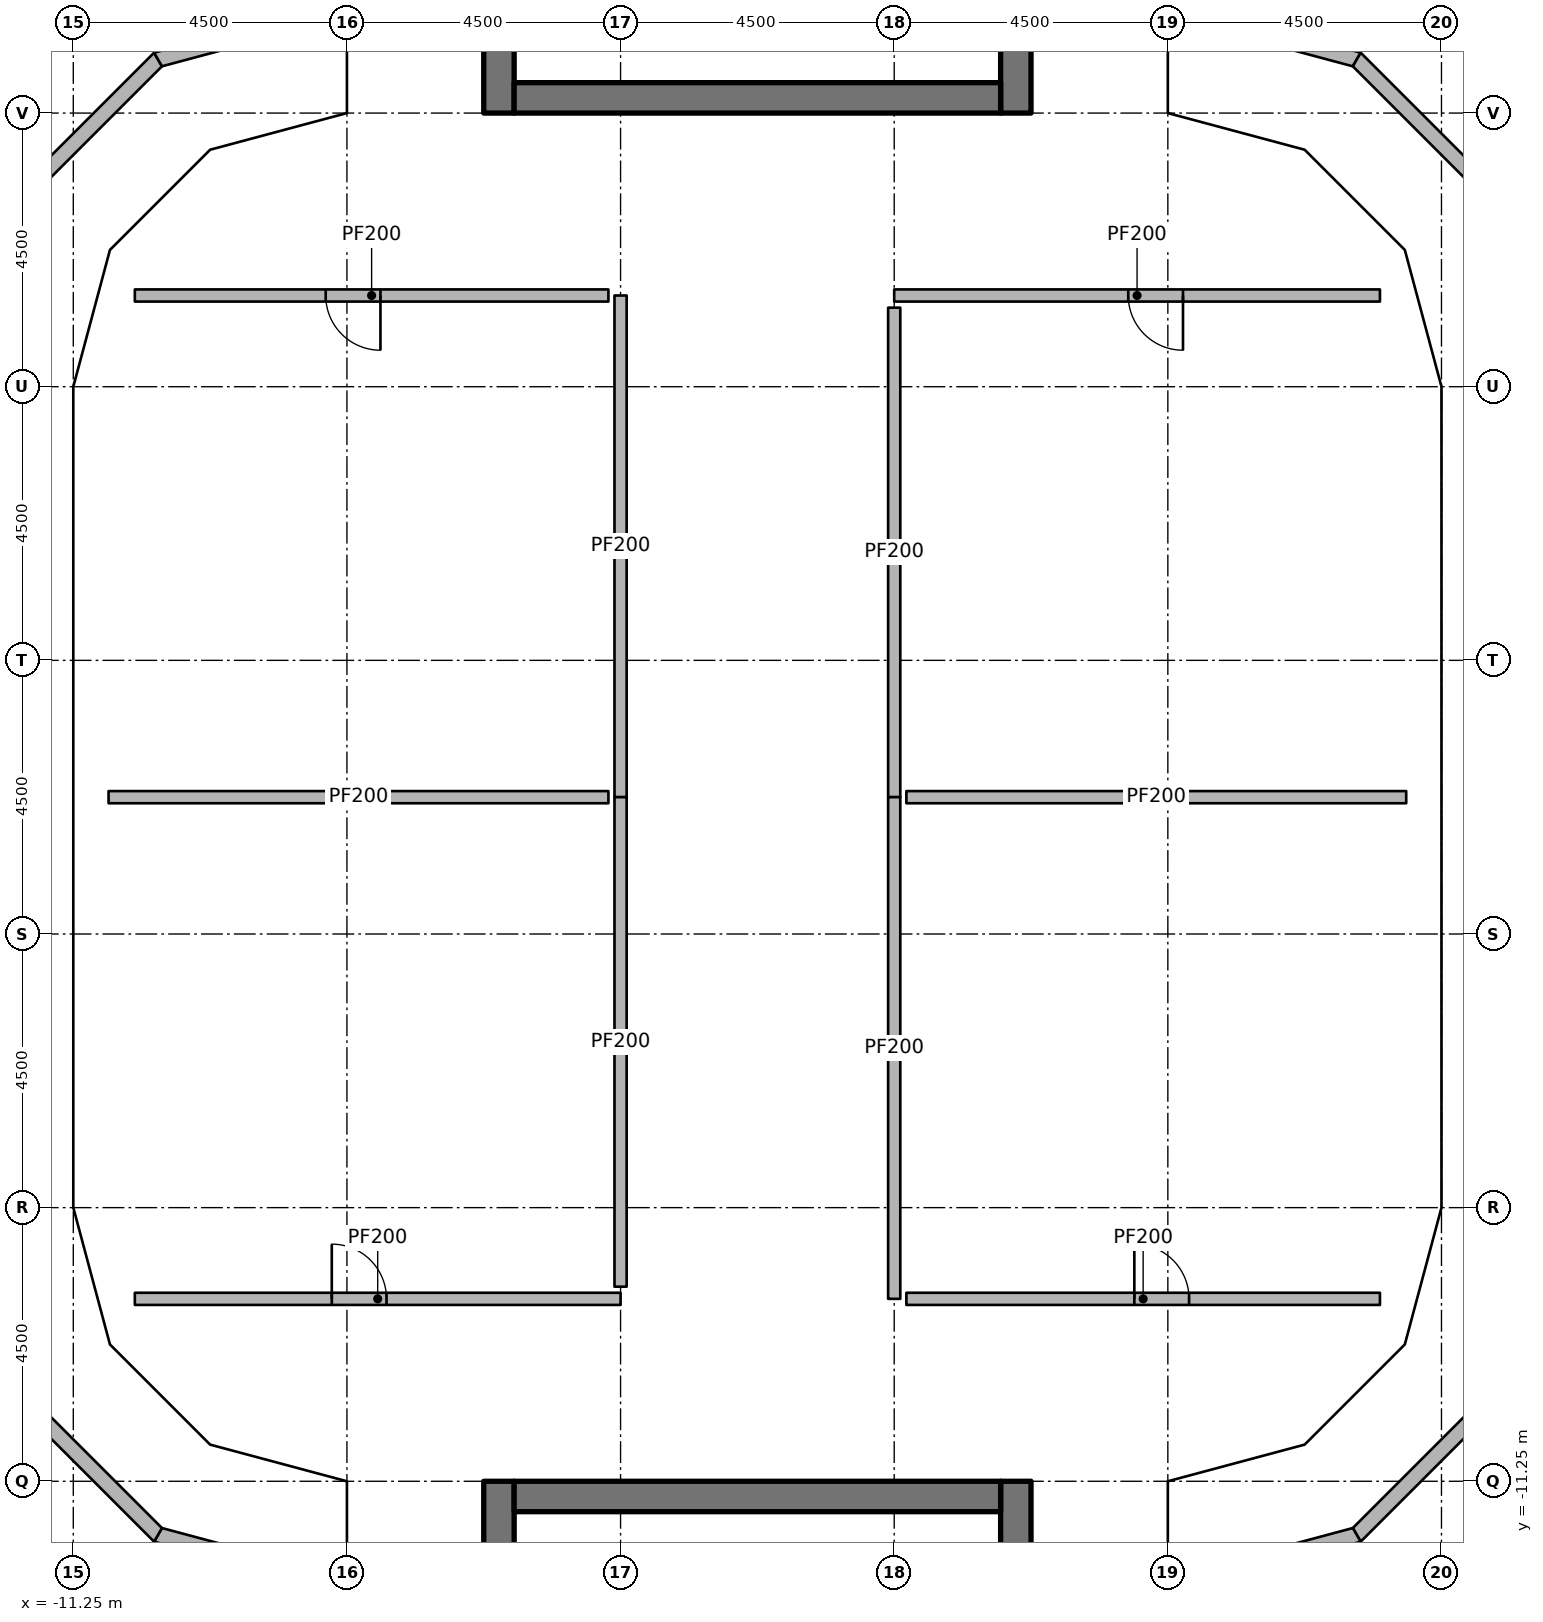
"""IFC4 building model, lengths in metres.
Left out: names, types, materials, properties, quantities, classifications, styles, units other than length and angle.
Written with IfcOpenShell. Run it as: python <this file> out.ifc"""

import sys

from ifc_helpers import new_model, si_unit, direction, frame, frame_2d, origin, origin_2d, place, context, subcontext, project, spatial, polyline, rectangle, outline, extrude, element, fill, save


model = new_model("IFC4")
c1 = context("Model", 3, precision=1e-05, world=origin(), true_north=direction((0.0, 1.0)))
c2 = subcontext(c1, "Body", "Model", "MODEL_VIEW")
j1 = project(units=[si_unit("LENGTHUNIT", "METRE"), si_unit("PLANEANGLEUNIT", "RADIAN")], contexts=[c1])
p1 = place(None, origin())
s1 = spatial("IfcSite", under=j1, at=p1, CompositionType="ELEMENT")
p2 = place(p1, origin())
s2 = spatial("IfcBuilding", under=s1, at=p2, CompositionType="ELEMENT")
p3 = place(p2, frame((0.0, 0.0, 302.4)))
s3 = spatial("IfcBuildingStorey", under=s2, at=p3, CompositionType="ELEMENT", Elevation=302.4)
for number, where, z_axis, x_axis in (
    (1, (-10.75, -6.25, 0.0), (0.0, 0.0, 1.0), (1.0, 0.0, 0.0)),
    (2, (-10.75, 6.25, 0.0), (0.0, 0.0, 1.0), (1.0, 0.0, 0.0)),
    (3, (-6.25, -10.75, 0.0), (0.0, 0.0, 1.0), (1.0, 0.0, 0.0)),
    (4, (-6.25, -6.25, 0.0), (0.0, 0.0, 1.0), (1.0, 0.0, 0.0)),
    (5, (-6.25, 6.25, 0.0), (0.0, 0.0, 1.0), (1.0, 0.0, 0.0)),
    (6, (-6.25, 10.75, 0.0), (0.0, 0.0, 1.0), (1.0, 0.0, 0.0)),
    (7, (6.25, -10.75, 0.0), (0.0, 0.0, 1.0), (1.0, 0.0, 0.0)),
    (8, (6.25, -6.25, 0.0), (0.0, 0.0, 1.0), (1.0, 0.0, 0.0)),
    (9, (6.25, 6.25, 0.0), (0.0, 0.0, 1.0), (1.0, 0.0, 0.0)),
    (10, (6.25, 10.75, 0.0), (0.0, 0.0, 1.0), (1.0, 0.0, 0.0)),
    (11, (10.75, -6.25, 0.0), (0.0, 0.0, 1.0), (1.0, 0.0, 0.0)),
    (12, (10.75, 6.25, 0.0), (0.0, 0.0, 1.0), (1.0, 0.0, 0.0)),
):
    element("IfcColumn", number, at=place(p3, frame(where, z_axis=z_axis, x_axis=x_axis)), inside=s3, PredefinedType="COLUMN", context=c2, shape_type="SweptSolid", body=[
        extrude(rectangle(XDim=0.6, YDim=0.6, at=origin_2d()), origin(), (0.0, 0.0, 1.0), 3.45),
    ])
p4 = place(p3, frame((-4.25, 11.25, 0.0), z_axis=(0.0, 0.0, 1.0), x_axis=(0.0, 1.0, 0.0)))
e13 = element("IfcWall", 13, at=p4, inside=s3, PredefinedType="SHEAR", context=c2, shape_type="SweptSolid", body=[
    extrude(rectangle(XDim=15.0, YDim=0.5, at=frame_2d((7.5, 0.0))), origin(), (0.0, 0.0, 1.0), 3.6),
])
p5 = place(p4, frame((7.15, 0.0, 0.0)))
e14 = element("IfcOpeningElement", 14, at=p5, cuts=e13, PredefinedType="OPENING", context=c2, shape_type="SweptSolid", body=[
    extrude(rectangle(XDim=1.5, YDim=2.3, at=frame_2d((0.75, 1.15))), frame((0.0, 0.26, 0.0), z_axis=(0.0, -1.0, 0.0), x_axis=(1.0, 0.0, 0.0)), (0.0, 0.0, 1.0), 0.52),
])
p6 = place(p4, frame((13.9, 0.0, 0.0)))
e15 = element("IfcOpeningElement", 15, at=p6, cuts=e13, PredefinedType="OPENING", context=c2, shape_type="SweptSolid", body=[
    extrude(rectangle(XDim=0.9, YDim=2.1, at=frame_2d((0.45, 1.05))), frame((0.0, 0.26, 0.0), z_axis=(0.0, -1.0, 0.0), x_axis=(1.0, 0.0, 0.0)), (0.0, 0.0, 1.0), 0.52),
])
p7 = place(p4, frame((1.15, 0.0, 0.0)))
e16 = element("IfcOpeningElement", 16, at=p7, cuts=e13, PredefinedType="OPENING", context=c2, shape_type="SweptSolid", body=[
    extrude(rectangle(XDim=1.2, YDim=2.1, at=frame_2d((0.6, 1.05))), frame((0.0, 0.26, 0.0), z_axis=(0.0, -1.0, 0.0), x_axis=(1.0, 0.0, 0.0)), (0.0, 0.0, 1.0), 0.52),
])
p8 = place(p3, frame((4.25, 11.25, 0.0), z_axis=(0.0, 0.0, 1.0), x_axis=(0.0, 1.0, 0.0)))
e17 = element("IfcWall", 17, at=p8, inside=s3, PredefinedType="SHEAR", context=c2, shape_type="SweptSolid", body=[
    extrude(rectangle(XDim=15.0, YDim=0.5, at=frame_2d((7.5, 0.0))), origin(), (0.0, 0.0, 1.0), 3.6),
])
p9 = place(p8, frame((7.15, 0.0, 0.0)))
e18 = element("IfcOpeningElement", 18, at=p9, cuts=e17, PredefinedType="OPENING", context=c2, shape_type="SweptSolid", body=[
    extrude(rectangle(XDim=1.5, YDim=2.3, at=frame_2d((0.75, 1.15))), frame((0.0, 0.26, 0.0), z_axis=(0.0, -1.0, 0.0), x_axis=(1.0, 0.0, 0.0)), (0.0, 0.0, 1.0), 0.52),
])
p10 = place(p8, frame((5.55, 0.0, 0.0)))
e19 = element("IfcOpeningElement", 19, at=p10, cuts=e17, PredefinedType="OPENING", context=c2, shape_type="SweptSolid", body=[
    extrude(rectangle(XDim=1.2, YDim=2.1, at=frame_2d((0.6, 1.05))), frame((0.0, 0.26, 0.0), z_axis=(0.0, -1.0, 0.0), x_axis=(1.0, 0.0, 0.0)), (0.0, 0.0, 1.0), 0.52),
])
p11 = place(p3, frame((-4.0, 11.5, 0.0), z_axis=(0.0, 0.0, 1.0), x_axis=(1.0, 0.0, 0.0)))
e20 = element("IfcWall", 20, at=p11, inside=s3, PredefinedType="SHEAR", context=c2, shape_type="SweptSolid", body=[
    extrude(rectangle(XDim=8.0, YDim=0.5, at=frame_2d((4.0, 0.0))), origin(), (0.0, 0.0, 1.0), 3.6),
])
p12 = place(p3, frame((-4.25, -11.25, 0.0), z_axis=(0.0, 0.0, 1.0), x_axis=(0.0, -1.0, 0.0)))
e21 = element("IfcWall", 21, at=p12, inside=s3, PredefinedType="SHEAR", context=c2, shape_type="SweptSolid", body=[
    extrude(rectangle(XDim=15.0, YDim=0.5, at=frame_2d((7.5, 0.0))), origin(), (0.0, 0.0, 1.0), 3.6),
])
p13 = place(p12, frame((7.15, 0.0, 0.0)))
e22 = element("IfcOpeningElement", 22, at=p13, cuts=e21, PredefinedType="OPENING", context=c2, shape_type="SweptSolid", body=[
    extrude(rectangle(XDim=1.5, YDim=2.3, at=frame_2d((0.75, 1.15))), frame((0.0, 0.26, 0.0), z_axis=(0.0, -1.0, 0.0), x_axis=(1.0, 0.0, 0.0)), (0.0, 0.0, 1.0), 0.52),
])
p14 = place(p12, frame((5.55, 0.0, 0.0)))
e23 = element("IfcOpeningElement", 23, at=p14, cuts=e21, PredefinedType="OPENING", context=c2, shape_type="SweptSolid", body=[
    extrude(rectangle(XDim=1.2, YDim=2.1, at=frame_2d((0.6, 1.05))), frame((0.0, 0.26, 0.0), z_axis=(0.0, -1.0, 0.0), x_axis=(1.0, 0.0, 0.0)), (0.0, 0.0, 1.0), 0.52),
])
p15 = place(p3, frame((4.25, -11.25, 0.0), z_axis=(0.0, 0.0, 1.0), x_axis=(0.0, -1.0, 0.0)))
e24 = element("IfcWall", 24, at=p15, inside=s3, PredefinedType="SHEAR", context=c2, shape_type="SweptSolid", body=[
    extrude(rectangle(XDim=15.0, YDim=0.5, at=frame_2d((7.5, 0.0))), origin(), (0.0, 0.0, 1.0), 3.6),
])
p16 = place(p15, frame((7.15, 0.0, 0.0)))
e25 = element("IfcOpeningElement", 25, at=p16, cuts=e24, PredefinedType="OPENING", context=c2, shape_type="SweptSolid", body=[
    extrude(rectangle(XDim=1.5, YDim=2.3, at=frame_2d((0.75, 1.15))), frame((0.0, 0.26, 0.0), z_axis=(0.0, -1.0, 0.0), x_axis=(1.0, 0.0, 0.0)), (0.0, 0.0, 1.0), 0.52),
])
p17 = place(p15, frame((13.9, 0.0, 0.0)))
e26 = element("IfcOpeningElement", 26, at=p17, cuts=e24, PredefinedType="OPENING", context=c2, shape_type="SweptSolid", body=[
    extrude(rectangle(XDim=0.9, YDim=2.1, at=frame_2d((0.45, 1.05))), frame((0.0, 0.26, 0.0), z_axis=(0.0, -1.0, 0.0), x_axis=(1.0, 0.0, 0.0)), (0.0, 0.0, 1.0), 0.52),
])
p18 = place(p15, frame((1.15, 0.0, 0.0)))
e27 = element("IfcOpeningElement", 27, at=p18, cuts=e24, PredefinedType="OPENING", context=c2, shape_type="SweptSolid", body=[
    extrude(rectangle(XDim=1.2, YDim=2.1, at=frame_2d((0.6, 1.05))), frame((0.0, 0.26, 0.0), z_axis=(0.0, -1.0, 0.0), x_axis=(1.0, 0.0, 0.0)), (0.0, 0.0, 1.0), 0.52),
])
p19 = place(p3, frame((-4.0, -11.5, 0.0), z_axis=(0.0, 0.0, 1.0), x_axis=(1.0, 0.0, 0.0)))
e28 = element("IfcWall", 28, at=p19, inside=s3, PredefinedType="SHEAR", context=c2, shape_type="SweptSolid", body=[
    extrude(rectangle(XDim=8.0, YDim=0.5, at=frame_2d((4.0, 0.0))), origin(), (0.0, 0.0, 1.0), 3.6),
])
p20 = place(p3, origin())
e29 = element("IfcWall", 29, at=p20, inside=s3, PredefinedType="PARAPET", context=c2, shape_type="SweptSolid", body=[
    extrude(outline(polyline([(-8.53, -12.616), (-9.921, -12.243), (-9.792, -12.019), (-8.28, -12.424), (-8.53, -12.616)])), origin(), (0.0, 0.0, 1.0), 1.22),
])
p21 = place(p3, origin())
e30 = element("IfcWall", 30, at=p21, inside=s3, PredefinedType="PARAPET", context=c2, shape_type="SweptSolid", body=[
    extrude(outline(polyline([(-9.921, -12.243), (-12.243, -9.921), (-12.019, -9.792), (-9.792, -12.019), (-9.921, -12.243)])), origin(), (0.0, 0.0, 1.0), 1.22),
])
p22 = place(p3, origin())
e31 = element("IfcWall", 31, at=p22, inside=s3, PredefinedType="PARAPET", context=c2, shape_type="SweptSolid", body=[
    extrude(outline(polyline([(-12.243, 9.921), (-9.921, 12.243), (-9.792, 12.019), (-12.019, 9.792), (-12.243, 9.921)])), origin(), (0.0, 0.0, 1.0), 1.22),
])
p23 = place(p3, origin())
e32 = element("IfcWall", 32, at=p23, inside=s3, PredefinedType="PARAPET", context=c2, shape_type="SweptSolid", body=[
    extrude(outline(polyline([(-9.921, 12.243), (-8.53, 12.616), (-8.28, 12.424), (-9.792, 12.019), (-9.921, 12.243)])), origin(), (0.0, 0.0, 1.0), 1.22),
])
p24 = place(p3, origin())
e33 = element("IfcWall", 33, at=p24, inside=s3, PredefinedType="PARAPET", context=c2, shape_type="SweptSolid", body=[
    extrude(outline(polyline([(8.53, 12.616), (9.921, 12.243), (9.792, 12.019), (8.28, 12.424), (8.53, 12.616)])), origin(), (0.0, 0.0, 1.0), 1.22),
])
p25 = place(p3, origin())
e34 = element("IfcWall", 34, at=p25, inside=s3, PredefinedType="PARAPET", context=c2, shape_type="SweptSolid", body=[
    extrude(outline(polyline([(9.921, 12.243), (12.243, 9.921), (12.019, 9.792), (9.792, 12.019), (9.921, 12.243)])), origin(), (0.0, 0.0, 1.0), 1.22),
])
p26 = place(p3, origin())
e35 = element("IfcWall", 35, at=p26, inside=s3, PredefinedType="PARAPET", context=c2, shape_type="SweptSolid", body=[
    extrude(outline(polyline([(12.243, -9.921), (9.921, -12.243), (9.792, -12.019), (12.019, -9.792), (12.243, -9.921)])), origin(), (0.0, 0.0, 1.0), 1.22),
])
p27 = place(p3, origin())
e36 = element("IfcWall", 36, at=p27, inside=s3, PredefinedType="PARAPET", context=c2, shape_type="SweptSolid", body=[
    extrude(outline(polyline([(9.921, -12.243), (8.53, -12.616), (8.28, -12.424), (9.792, -12.019), (9.921, -12.243)])), origin(), (0.0, 0.0, 1.0), 1.22),
])
p28 = place(p3, frame((10.238, 8.25, 0.0), z_axis=(0.0, 0.0, 1.0), x_axis=(-1.0, 0.0, 0.0)))
e37 = element("IfcWall", 37, at=p28, inside=s3, PredefinedType="PARTITIONING", context=c2, shape_type="SweptSolid", body=[
    extrude(rectangle(XDim=7.988, YDim=0.2, at=frame_2d((3.994, 0.0))), origin(), (0.0, 0.0, 1.0), 2.53),
])
p29 = place(p28, frame((3.239, 0.0, 0.0)))
e38 = element("IfcOpeningElement", 38, at=p29, cuts=e37, PredefinedType="OPENING", context=c2, shape_type="SweptSolid", body=[
    extrude(rectangle(XDim=0.9, YDim=2.1, at=frame_2d((0.45, 1.05))), frame((0.0, 0.11, 0.0), z_axis=(0.0, -1.0, 0.0), x_axis=(1.0, 0.0, 0.0)), (0.0, 0.0, 1.0), 0.22),
])
p30 = place(p3, frame((2.25, 8.05, 0.0), z_axis=(0.0, 0.0, 1.0), x_axis=(0.0, -1.0, 0.0)))
e39 = element("IfcWall", 39, at=p30, inside=s3, PredefinedType="PARTITIONING", context=c2, shape_type="SweptSolid", body=[
    extrude(rectangle(XDim=8.05, YDim=0.2, at=frame_2d((4.025, 0.0))), origin(), (0.0, 0.0, 1.0), 2.828),
])
p31 = place(p3, frame((2.25, 0.0, 0.0), z_axis=(0.0, 0.0, 1.0), x_axis=(0.0, -1.0, 0.0)))
e40 = element("IfcWall", 40, at=p31, inside=s3, PredefinedType="PARTITIONING", context=c2, shape_type="SweptSolid", body=[
    extrude(rectangle(XDim=8.25, YDim=0.2, at=frame_2d((4.125, 0.0))), origin(), (0.0, 0.0, 1.0), 2.828),
])
p32 = place(p3, frame((2.45, -8.25, 0.0), z_axis=(0.0, 0.0, 1.0), x_axis=(1.0, 0.0, 0.0)))
e41 = element("IfcWall", 41, at=p32, inside=s3, PredefinedType="PARTITIONING", context=c2, shape_type="SweptSolid", body=[
    extrude(rectangle(XDim=7.788, YDim=0.2, at=frame_2d((3.894, 0.0))), origin(), (0.0, 0.0, 1.0), 2.53),
])
p33 = place(p32, frame((3.749, 0.0, 0.0)))
e42 = element("IfcOpeningElement", 42, at=p33, cuts=e41, PredefinedType="OPENING", context=c2, shape_type="SweptSolid", body=[
    extrude(rectangle(XDim=0.9, YDim=2.1, at=frame_2d((0.45, 1.05))), frame((0.0, 0.11, 0.0), z_axis=(0.0, -1.0, 0.0), x_axis=(1.0, 0.0, 0.0)), (0.0, 0.0, 1.0), 0.22),
])
p34 = place(p3, frame((-2.25, 0.0, 0.0), z_axis=(0.0, 0.0, 1.0), x_axis=(0.0, 1.0, 0.0)))
e43 = element("IfcWall", 43, at=p34, inside=s3, PredefinedType="PARTITIONING", context=c2, shape_type="SweptSolid", body=[
    extrude(rectangle(XDim=8.25, YDim=0.2, at=frame_2d((4.125, 0.0))), origin(), (0.0, 0.0, 1.0), 2.828),
])
p35 = place(p3, frame((-2.45, 8.25, 0.0), z_axis=(0.0, 0.0, 1.0), x_axis=(-1.0, 0.0, 0.0)))
e44 = element("IfcWall", 44, at=p35, inside=s3, PredefinedType="PARTITIONING", context=c2, shape_type="SweptSolid", body=[
    extrude(rectangle(XDim=7.788, YDim=0.2, at=frame_2d((3.894, 0.0))), origin(), (0.0, 0.0, 1.0), 2.53),
])
p36 = place(p35, frame((3.749, 0.0, 0.0)))
e45 = element("IfcOpeningElement", 45, at=p36, cuts=e44, PredefinedType="OPENING", context=c2, shape_type="SweptSolid", body=[
    extrude(rectangle(XDim=0.9, YDim=2.1, at=frame_2d((0.45, 1.05))), frame((0.0, 0.11, 0.0), z_axis=(0.0, -1.0, 0.0), x_axis=(1.0, 0.0, 0.0)), (0.0, 0.0, 1.0), 0.22),
])
p37 = place(p3, frame((-10.238, -8.25, 0.0), z_axis=(0.0, 0.0, 1.0), x_axis=(1.0, 0.0, 0.0)))
e46 = element("IfcWall", 46, at=p37, inside=s3, PredefinedType="PARTITIONING", context=c2, shape_type="SweptSolid", body=[
    extrude(rectangle(XDim=7.988, YDim=0.2, at=frame_2d((3.994, 0.0))), origin(), (0.0, 0.0, 1.0), 2.53),
])
p38 = place(p37, frame((3.239, 0.0, 0.0)))
e47 = element("IfcOpeningElement", 47, at=p38, cuts=e46, PredefinedType="OPENING", context=c2, shape_type="SweptSolid", body=[
    extrude(rectangle(XDim=0.9, YDim=2.1, at=frame_2d((0.45, 1.05))), frame((0.0, 0.11, 0.0), z_axis=(0.0, -1.0, 0.0), x_axis=(1.0, 0.0, 0.0)), (0.0, 0.0, 1.0), 0.22),
])
p39 = place(p3, frame((-2.25, -8.05, 0.0), z_axis=(0.0, 0.0, 1.0), x_axis=(0.0, 1.0, 0.0)))
e48 = element("IfcWall", 48, at=p39, inside=s3, PredefinedType="PARTITIONING", context=c2, shape_type="SweptSolid", body=[
    extrude(rectangle(XDim=8.05, YDim=0.2, at=frame_2d((4.025, 0.0))), origin(), (0.0, 0.0, 1.0), 2.828),
])
for number, where, z_axis, x_axis in (
    (49, (10.67, 0.0, 0.0), (0.0, 0.0, 1.0), (-1.0, 0.0, 0.0)),
    (50, (-2.45, 0.0, 0.0), (0.0, 0.0, 1.0), (-1.0, 0.0, 0.0)),
):
    element("IfcWall", number, at=place(p3, frame(where, z_axis=z_axis, x_axis=x_axis)), inside=s3, PredefinedType="PARTITIONING", context=c2, shape_type="SweptSolid", body=[
        extrude(rectangle(XDim=8.22, YDim=0.2, at=frame_2d((4.11, 0.0))), origin(), (0.0, 0.0, 1.0), 2.53),
    ])
p40 = place(p29, origin())
e51 = element("IfcDoor", 51, at=p40, inside=s3, OperationType="SINGLE_SWING_LEFT", PredefinedType="DOOR", context=c2, shape_type="SweptSolid", body=[
    extrude(rectangle(XDim=0.9, YDim=2.1, at=frame_2d((0.45, 1.05))), frame((0.0, 0.025, 0.0), z_axis=(0.0, -1.0, 0.0), x_axis=(1.0, 0.0, 0.0)), (0.0, 0.0, 1.0), 0.05),
])
fill(e38, e51)
p41 = place(p33, origin())
e52 = element("IfcDoor", 52, at=p41, inside=s3, OperationType="SINGLE_SWING_LEFT", PredefinedType="DOOR", context=c2, shape_type="SweptSolid", body=[
    extrude(rectangle(XDim=0.9, YDim=2.1, at=frame_2d((0.45, 1.05))), frame((0.0, 0.025, 0.0), z_axis=(0.0, -1.0, 0.0), x_axis=(1.0, 0.0, 0.0)), (0.0, 0.0, 1.0), 0.05),
])
fill(e42, e52)
p42 = place(p36, origin())
e53 = element("IfcDoor", 53, at=p42, inside=s3, OperationType="SINGLE_SWING_LEFT", PredefinedType="DOOR", context=c2, shape_type="SweptSolid", body=[
    extrude(rectangle(XDim=0.9, YDim=2.1, at=frame_2d((0.45, 1.05))), frame((0.0, 0.025, 0.0), z_axis=(0.0, -1.0, 0.0), x_axis=(1.0, 0.0, 0.0)), (0.0, 0.0, 1.0), 0.05),
])
fill(e45, e53)
p43 = place(p38, origin())
e54 = element("IfcDoor", 54, at=p43, inside=s3, OperationType="SINGLE_SWING_LEFT", PredefinedType="DOOR", context=c2, shape_type="SweptSolid", body=[
    extrude(rectangle(XDim=0.9, YDim=2.1, at=frame_2d((0.45, 1.05))), frame((0.0, 0.025, 0.0), z_axis=(0.0, -1.0, 0.0), x_axis=(1.0, 0.0, 0.0)), (0.0, 0.0, 1.0), 0.05),
])
fill(e47, e54)
save(model, sys.argv[1])
